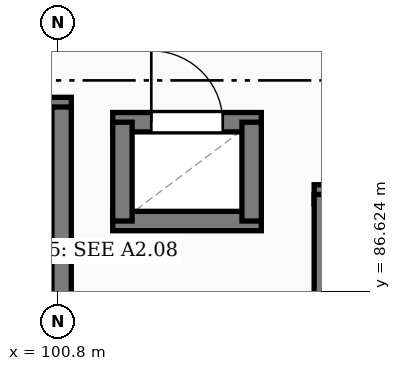
"""IFC4 building model, lengths in metres.
Left out: names, types, materials, properties, quantities, classifications, styles, units other than length and angle.
Written with IfcOpenShell. Run it as: python <this file> out.ifc"""

import sys

from ifc_helpers import new_model, si_unit, direction, frame, frame_2d, origin, place, context, subcontext, project, spatial, rectangle, extrude, element, fill, save


model = new_model("IFC4")
c1 = context("Model", 3, precision=1e-05, world=origin(), true_north=direction((0.0, 1.0)))
c2 = subcontext(c1, "Body", "Model", "MODEL_VIEW")
j1 = project(units=[si_unit("LENGTHUNIT", "METRE"), si_unit("PLANEANGLEUNIT", "RADIAN")], contexts=[c1])
p1 = place(None, origin())
s1 = spatial("IfcSite", under=j1, at=p1, CompositionType="ELEMENT")
p2 = place(p1, origin())
s2 = spatial("IfcBuilding", under=s1, at=p2, CompositionType="ELEMENT")
p3 = place(p2, frame((0.0, 0.0, 3.92)))
s3 = spatial("IfcBuildingStorey", under=s2, at=p3, CompositionType="ELEMENT", Elevation=3.92)
p4 = place(p3, frame((92.752, 89.05, 0.0), z_axis=(0.0, 0.0, 1.0), x_axis=(1.0, 0.0, 0.0)))
e1 = element("IfcWall", 1, at=p4, inside=s3, PredefinedType="SOLIDWALL", context=c2, shape_type="SweptSolid", body=[
    extrude(rectangle(XDim=8.225, YDim=0.255, at=frame_2d((4.113, 0.0))), origin(), (0.0, 0.0, 1.0), 3.36),
])
p5 = place(p4, frame((0.35, 0.0, 0.0)))
e2 = element("IfcOpeningElement", 2, at=p5, cuts=e1, PredefinedType="OPENING", context=c2, shape_type="SweptSolid", body=[
    extrude(rectangle(XDim=1.25, YDim=2.2, at=frame_2d((0.625, 1.1))), frame((0.0, 0.137, 0.0), z_axis=(0.0, -1.0, 0.0), x_axis=(1.0, 0.0, 0.0)), (0.0, 0.0, 1.0), 0.275),
])
p6 = place(p3, frame((100.85, 85.18, 0.0), z_axis=(0.0, 0.0, 1.0), x_axis=(0.0, 1.0, 0.0)))
e3 = element("IfcWall", 3, at=p6, inside=s3, PredefinedType="SOLIDWALL", context=c2, shape_type="SweptSolid", body=[
    extrude(rectangle(XDim=3.87, YDim=0.255, at=frame_2d((1.935, 0.0))), origin(), (0.0, 0.0, 1.0), 3.36),
])
p7 = place(p3, frame((104.173, 87.9, 0.0), z_axis=(0.0, 0.0, 1.0), x_axis=(1.0, 0.0, 0.0)))
e4 = element("IfcWall", 4, at=p7, inside=s3, PredefinedType="SOLIDWALL", context=c2, shape_type="SweptSolid", body=[
    extrude(rectangle(XDim=2.455, YDim=0.255, at=frame_2d((1.228, 0.0))), origin(), (0.0, 0.0, 1.0), 3.36),
])
p8 = place(p7, frame((0.677, 0.0, 0.0)))
e5 = element("IfcOpeningElement", 5, at=p8, cuts=e4, PredefinedType="OPENING", context=c2, shape_type="SweptSolid", body=[
    extrude(rectangle(XDim=1.1, YDim=2.15, at=frame_2d((0.55, 1.075))), frame((0.0, 0.137, 0.0), z_axis=(0.0, -1.0, 0.0), x_axis=(1.0, 0.0, 0.0)), (0.0, 0.0, 1.0), 0.275),
])
p9 = place(p3, frame((104.3, 85.3, 0.0), z_axis=(0.0, 0.0, 1.0), x_axis=(0.0, 1.0, 0.0)))
e6 = element("IfcWall", 6, at=p9, inside=s3, PredefinedType="SOLIDWALL", context=c2, shape_type="SweptSolid", body=[
    extrude(rectangle(XDim=2.6, YDim=0.255, at=frame_2d((1.3, 0.0))), origin(), (0.0, 0.0, 1.0), 3.36),
])
p10 = place(p3, frame((101.522, 87.55, 0.0), z_axis=(0.0, 0.0, 1.0), x_axis=(1.0, 0.0, 0.0)))
e7 = element("IfcWall", 7, at=p10, inside=s3, PredefinedType="SOLIDWALL", context=c2, shape_type="SweptSolid", body=[
    extrude(rectangle(XDim=1.955, YDim=0.255, at=frame_2d((0.978, 0.0))), origin(), (0.0, 0.0, 1.0), 3.36),
])
p11 = place(p3, frame((101.522, 88.85, 0.0), z_axis=(0.0, 0.0, 1.0), x_axis=(1.0, 0.0, 0.0)))
e8 = element("IfcWall", 8, at=p11, inside=s3, PredefinedType="SOLIDWALL", context=c2, shape_type="SweptSolid", body=[
    extrude(rectangle(XDim=1.955, YDim=0.255, at=frame_2d((0.978, 0.0))), origin(), (0.0, 0.0, 1.0), 3.36),
])
p12 = place(p11, frame((0.508, 0.0, 0.0)))
e9 = element("IfcOpeningElement", 9, at=p12, cuts=e8, PredefinedType="OPENING", context=c2, shape_type="SweptSolid", body=[
    extrude(rectangle(XDim=0.94, YDim=2.1, at=frame_2d((0.47, 1.05))), frame((0.0, 0.137, 0.0), z_axis=(0.0, -1.0, 0.0), x_axis=(1.0, 0.0, 0.0)), (0.0, 0.0, 1.0), 0.275),
])
for number, where, z_axis, x_axis in (
    (10, (101.65, 87.55, 0.0), (0.0, 0.0, 1.0), (0.0, 1.0, 0.0)),
    (11, (103.35, 87.55, 0.0), (0.0, 0.0, 1.0), (0.0, 1.0, 0.0)),
):
    element("IfcWall", number, at=place(p3, frame(where, z_axis=z_axis, x_axis=x_axis)), inside=s3, PredefinedType="SOLIDWALL", context=c2, shape_type="SweptSolid", body=[
        extrude(rectangle(XDim=1.3, YDim=0.255, at=frame_2d((0.65, 0.0))), origin(), (0.0, 0.0, 1.0), 3.36),
    ])
p13 = place(p12, origin())
e12 = element("IfcDoor", 12, at=p13, inside=s3, OperationType="SINGLE_SWING_LEFT", PredefinedType="DOOR", context=c2, shape_type="SweptSolid", body=[
    extrude(rectangle(XDim=0.94, YDim=2.1, at=frame_2d((0.47, 1.05))), frame((0.0, 0.025, 0.0), z_axis=(0.0, -1.0, 0.0), x_axis=(1.0, 0.0, 0.0)), (0.0, 0.0, 1.0), 0.05),
])
fill(e9, e12)
save(model, sys.argv[1])
